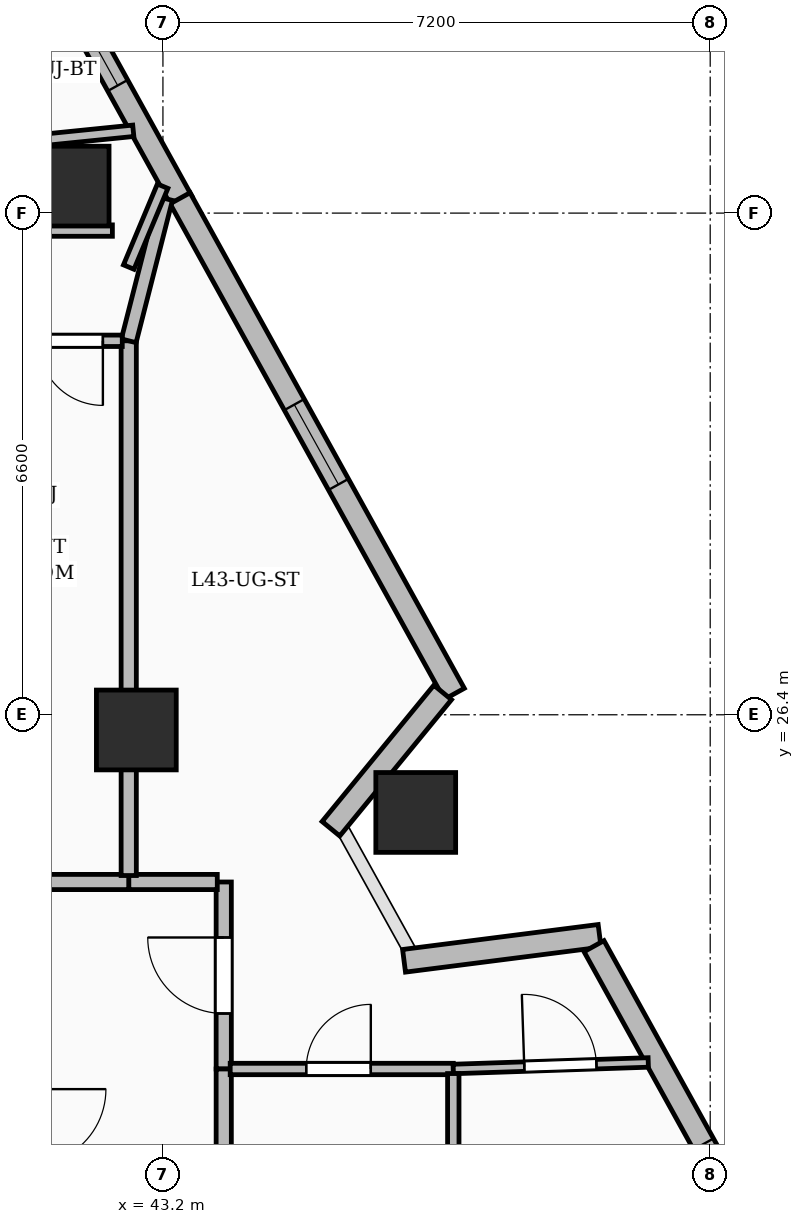
"""IFC4 building model, lengths in metres.
Left out: names, types, materials, properties, quantities, classifications, styles, units other than length and angle.
Written with IfcOpenShell. Run it as: python <this file> out.ifc"""

import sys

from ifc_helpers import new_model, si_unit, direction, frame, frame_2d, origin, origin_2d, place, context, subcontext, project, spatial, rectangle, extrude, element, fill, save


model = new_model("IFC4")
c1 = context("Model", 3, precision=1e-05, world=origin(), true_north=direction((0.0, 1.0)))
c2 = subcontext(c1, "Body", "Model", "MODEL_VIEW")
j1 = project(units=[si_unit("LENGTHUNIT", "METRE"), si_unit("PLANEANGLEUNIT", "RADIAN")], contexts=[c1])
p1 = place(None, origin())
s1 = spatial("IfcSite", under=j1, at=p1, CompositionType="ELEMENT")
p2 = place(p1, origin())
s2 = spatial("IfcBuilding", under=s1, at=p2, CompositionType="ELEMENT")
p3 = place(p2, frame((0.0, 0.0, 168.0)))
s3 = spatial("IfcBuildingStorey", under=s2, at=p3, CompositionType="ELEMENT", Elevation=168.0)
for number, where, z_axis, x_axis in (
    (1, (42.85, 26.2, 0.0), (0.0, 0.0, 1.0), (1.0, 0.0, 0.0)),
    (2, (46.526, 25.115, 0.0), (0.0, 0.0, 1.0), (1.0, 0.0, 0.0)),
    (3, (41.966, 33.355, 0.0), (0.0, 0.0, 1.0), (1.0, 0.0, 0.0)),
):
    element("IfcColumn", number, at=place(p3, frame(where, z_axis=z_axis, x_axis=x_axis)), inside=s3, PredefinedType="COLUMN", context=c2, shape_type="SweptSolid", body=[
        extrude(rectangle(XDim=1.05, YDim=1.05, at=origin_2d()), origin(), (0.0, 0.0, 1.0), 3.6),
    ])
p4 = place(p3, frame((40.148, 39.119, 0.0), z_axis=(0.0, 0.0, 1.0), x_axis=(0.484162803577, -0.87497793094, 0.0)))
e4 = element("IfcWall", 4, at=p4, inside=s3, PredefinedType="SOLIDWALL", context=c2, shape_type="SweptSolid", body=[
    extrude(rectangle(XDim=6.823, YDim=0.3, at=frame_2d((3.412, 0.0))), origin(), (0.0, 0.0, 1.0), 3.35),
])
p5 = place(p4, frame((3.575, 0.0, 0.6)))
e5 = element("IfcOpeningElement", 5, at=p5, cuts=e4, PredefinedType="OPENING", context=c2, shape_type="SweptSolid", body=[
    extrude(rectangle(XDim=1.5, YDim=2.1, at=frame_2d((0.75, 1.05))), frame((0.0, 0.16, 0.0), z_axis=(0.0, -1.0, 0.0), x_axis=(1.0, 0.0, 0.0)), (0.0, 0.0, 1.0), 0.32),
])
p6 = place(p3, frame((43.426, 33.195, 0.0), z_axis=(0.0, 0.0, 1.0), x_axis=(0.484187348611, -0.874964348671, 0.0)))
e6 = element("IfcWall", 6, at=p6, inside=s3, PredefinedType="SOLIDWALL", context=c2, shape_type="SweptSolid", body=[
    extrude(rectangle(XDim=7.451, YDim=0.3, at=frame_2d((3.726, 0.0))), origin(), (0.0, 0.0, 1.0), 3.35),
])
p7 = place(p6, frame((3.103, 0.0, 0.8)))
e7 = element("IfcOpeningElement", 7, at=p7, cuts=e6, PredefinedType="OPENING", context=c2, shape_type="SweptSolid", body=[
    extrude(rectangle(XDim=1.2, YDim=1.8, at=frame_2d((0.6, 0.9))), frame((0.0, 0.16, 0.0), z_axis=(0.0, -1.0, 0.0), x_axis=(1.0, 0.0, 0.0)), (0.0, 0.0, 1.0), 0.32),
])
p8 = place(p3, frame((46.88, 26.694, 0.0), z_axis=(0.0, 0.0, 1.0), x_axis=(-0.634074551455, -0.773271920606, 0.0)))
e8 = element("IfcWall", 8, at=p8, inside=s3, PredefinedType="SOLIDWALL", context=c2, shape_type="SweptSolid", body=[
    extrude(rectangle(XDim=2.319, YDim=0.3, at=frame_2d((1.159, 0.0))), origin(), (0.0, 0.0, 1.0), 2.575),
])
p9 = place(p3, frame((46.372, 23.163, 0.0), z_axis=(0.0, 0.0, 1.0), x_axis=(0.991953049751, 0.126606267974, 0.0)))
e9 = element("IfcWall", 9, at=p9, inside=s3, PredefinedType="SOLIDWALL", context=c2, shape_type="SweptSolid", body=[
    extrude(rectangle(XDim=2.594, YDim=0.3, at=frame_2d((1.297, 0.0))), origin(), (0.0, 0.0, 1.0), 2.575),
])
p10 = place(p3, frame((48.871, 23.356, 0.0), z_axis=(0.0, 0.0, 1.0), x_axis=(0.484178775102, -0.874969093021, 0.0)))
e10 = element("IfcWall", 10, at=p10, inside=s3, PredefinedType="SOLIDWALL", context=c2, shape_type="SweptSolid", body=[
    extrude(rectangle(XDim=6.742, YDim=0.3, at=frame_2d((3.371, 0.0))), origin(), (0.0, 0.0, 1.0), 3.35),
])
p11 = place(p10, frame((2.975, 0.0, 0.6)))
e11 = element("IfcOpeningElement", 11, at=p11, cuts=e10, PredefinedType="OPENING", context=c2, shape_type="SweptSolid", body=[
    extrude(rectangle(XDim=1.8, YDim=2.1, at=frame_2d((0.9, 1.05))), frame((0.0, 0.16, 0.0), z_axis=(0.0, -1.0, 0.0), x_axis=(1.0, 0.0, 0.0)), (0.0, 0.0, 1.0), 0.32),
])
p12 = place(p3, frame((44.0, 21.74, 0.0), z_axis=(0.0, 0.0, 1.0), x_axis=(0.0, 1.0, 0.0)))
e12 = element("IfcWall", 12, at=p12, inside=s3, PredefinedType="PARTITIONING", context=c2, shape_type="SweptSolid", body=[
    extrude(rectangle(XDim=2.46, YDim=0.2, at=frame_2d((1.23, 0.0))), origin(), (0.0, 0.0, 1.0), 2.436),
])
p13 = place(p12, frame((0.73, 0.0, 0.0)))
e13 = element("IfcOpeningElement", 13, at=p13, cuts=e12, PredefinedType="OPENING", context=c2, shape_type="SweptSolid", body=[
    extrude(rectangle(XDim=1.0, YDim=2.2, at=frame_2d((0.5, 1.1))), frame((0.0, 0.11, 0.0), z_axis=(0.0, -1.0, 0.0), x_axis=(1.0, 0.0, 0.0)), (0.0, 0.0, 1.0), 0.22),
])
p14 = place(p3, frame((43.915, 24.2, 0.0), z_axis=(0.0, 0.0, 1.0), x_axis=(-1.0, 0.0, 0.0)))
e14 = element("IfcWall", 14, at=p14, inside=s3, PredefinedType="PARTITIONING", context=c2, shape_type="SweptSolid", body=[
    extrude(rectangle(XDim=1.165, YDim=0.2, at=frame_2d((0.583, 0.0))), origin(), (0.0, 0.0, 1.0), 2.436),
])
p15 = place(p3, frame((44.0, 19.42, 0.0), z_axis=(0.0, 0.0, 1.0), x_axis=(0.0, 1.0, 0.0)))
e15 = element("IfcWall", 15, at=p15, inside=s3, PredefinedType="PARTITIONING", context=c2, shape_type="SweptSolid", body=[
    extrude(rectangle(XDim=2.32, YDim=0.2, at=frame_2d((1.16, 0.0))), origin(), (0.0, 0.0, 1.0), 3.35),
])
p16 = place(p3, frame((42.75, 24.2, 0.0), z_axis=(0.0, 0.0, 1.0), x_axis=(-1.0, 0.0, 0.0)))
e16 = element("IfcWall", 16, at=p16, inside=s3, PredefinedType="PARTITIONING", context=c2, shape_type="SweptSolid", body=[
    extrude(rectangle(XDim=1.3, YDim=0.2, at=frame_2d((0.65, 0.0))), origin(), (0.0, 0.0, 1.0), 3.35),
])
p17 = place(p3, frame((44.085, 21.74, 0.0), z_axis=(0.0, 0.0, 1.0), x_axis=(1.0, 0.0, 0.0)))
e17 = element("IfcWall", 17, at=p17, inside=s3, PredefinedType="PARTITIONING", context=c2, shape_type="SweptSolid", body=[
    extrude(rectangle(XDim=2.935, YDim=0.15, at=frame_2d((1.468, 0.0))), origin(), (0.0, 0.0, 1.0), 2.393),
])
p18 = place(p17, frame((1.0, 0.0, 0.0)))
e18 = element("IfcOpeningElement", 18, at=p18, cuts=e17, PredefinedType="OPENING", context=c2, shape_type="SweptSolid", body=[
    extrude(rectangle(XDim=0.85, YDim=2.1, at=frame_2d((0.425, 1.05))), frame((0.0, 0.085, 0.0), z_axis=(0.0, -1.0, 0.0), x_axis=(1.0, 0.0, 0.0)), (0.0, 0.0, 1.0), 0.17),
])
p19 = place(p3, frame((47.02, 21.74, 0.0), z_axis=(0.0, 0.0, 1.0), x_axis=(0.999439190858, 0.03348587428, 0.0)))
e19 = element("IfcWall", 19, at=p19, inside=s3, PredefinedType="PARTITIONING", context=c2, shape_type="SweptSolid", body=[
    extrude(rectangle(XDim=2.566, YDim=0.125, at=frame_2d((1.283, 0.0))), origin(), (0.0, 0.0, 1.0), 2.57),
])
p20 = place(p19, frame((0.934, 0.0, 0.0)))
e20 = element("IfcOpeningElement", 20, at=p20, cuts=e19, PredefinedType="OPENING", context=c2, shape_type="SweptSolid", body=[
    extrude(rectangle(XDim=0.95, YDim=2.2, at=frame_2d((0.475, 1.1))), frame((0.0, 0.072, 0.0), z_axis=(0.0, -1.0, 0.0), x_axis=(1.0, 0.0, 0.0)), (0.0, 0.0, 1.0), 0.145),
])
p21 = place(p3, frame((42.75, 31.32, 0.0), z_axis=(0.0, 0.0, 1.0), x_axis=(0.0, -1.0, 0.0)))
e21 = element("IfcWall", 21, at=p21, inside=s3, PredefinedType="PARTITIONING", context=c2, shape_type="SweptSolid", body=[
    extrude(rectangle(XDim=7.035, YDim=0.2, at=frame_2d((3.518, 0.0))), origin(), (0.0, 0.0, 1.0), 2.393),
])
p22 = place(p3, frame((43.228, 33.192, 0.0), z_axis=(0.0, 0.0, 1.0), x_axis=(-0.247320136716, -0.968933821257, 0.0)))
e22 = element("IfcWall", 22, at=p22, inside=s3, PredefinedType="PARTITIONING", context=c2, shape_type="SweptSolid", body=[
    extrude(rectangle(XDim=1.932, YDim=0.2, at=frame_2d((0.966, 0.0))), origin(), (0.0, 0.0, 1.0), 2.57),
])
p23 = place(p3, frame((47.02, 17.835, 0.0), z_axis=(0.0, 0.0, 1.0), x_axis=(0.0, 1.0, 0.0)))
e23 = element("IfcWall", 23, at=p23, inside=s3, PredefinedType="PARTITIONING", context=c2, shape_type="SweptSolid", body=[
    extrude(rectangle(XDim=3.845, YDim=0.15, at=frame_2d((1.922, 0.0))), origin(), (0.0, 0.0, 1.0), 2.771),
])
p24 = place(p3, frame((42.665, 31.32, 0.0), z_axis=(0.0, 0.0, 1.0), x_axis=(-1.0, 0.0, 0.0)))
e24 = element("IfcWall", 24, at=p24, inside=s3, PredefinedType="PARTITIONING", context=c2, shape_type="SweptSolid", body=[
    extrude(rectangle(XDim=1.545, YDim=0.15, at=frame_2d((0.772, 0.0))), origin(), (0.0, 0.0, 1.0), 2.393),
])
p25 = place(p24, frame((0.255, 0.0, 0.0)))
e25 = element("IfcOpeningElement", 25, at=p25, cuts=e24, PredefinedType="OPENING", context=c2, shape_type="SweptSolid", body=[
    extrude(rectangle(XDim=0.85, YDim=2.1, at=frame_2d((0.425, 1.05))), frame((0.0, 0.085, 0.0), z_axis=(0.0, -1.0, 0.0), x_axis=(1.0, 0.0, 0.0)), (0.0, 0.0, 1.0), 0.17),
])
p26 = place(p3, frame((42.75, 32.29, 0.0), z_axis=(0.0, 0.0, 1.0), x_axis=(0.38662798091, 0.922235763987, 0.0)))
e26 = element("IfcWall", 26, at=p26, inside=s3, PredefinedType="PARTITIONING", context=c2, shape_type="SweptSolid", body=[
    extrude(rectangle(XDim=1.154, YDim=0.15, at=frame_2d((0.577, 0.0))), origin(), (0.0, 0.0, 1.0), 2.57),
])
p27 = place(p3, frame((42.535, 32.77, 0.0), z_axis=(0.0, 0.0, 1.0), x_axis=(-1.0, 0.0, 0.0)))
e27 = element("IfcWall", 27, at=p27, inside=s3, PredefinedType="PARTITIONING", context=c2, shape_type="SweptSolid", body=[
    extrude(rectangle(XDim=1.155, YDim=0.15, at=frame_2d((0.578, 0.0))), origin(), (0.0, 0.0, 1.0), 2.393),
])
p28 = place(p3, frame((41.398, 33.94, 0.0), z_axis=(0.0, 0.0, 1.0), x_axis=(0.994906914974, 0.10079796891, 0.0)))
e28 = element("IfcWall", 28, at=p28, inside=s3, PredefinedType="PARTITIONING", context=c2, shape_type="SweptSolid", body=[
    extrude(rectangle(XDim=1.419, YDim=0.15, at=frame_2d((0.71, 0.0))), origin(), (0.0, 0.0, 1.0), 3.35),
])
p29 = place(p5, origin())
e29 = element("IfcWindow", 29, at=p29, inside=s3, PartitioningType="SINGLE_PANEL", PredefinedType="WINDOW", context=c2, shape_type="SweptSolid", body=[
    extrude(rectangle(XDim=1.5, YDim=2.1, at=frame_2d((0.75, 1.05))), frame((0.0, 0.03, 0.0), z_axis=(0.0, -1.0, 0.0), x_axis=(1.0, 0.0, 0.0)), (0.0, 0.0, 1.0), 0.06),
])
fill(e5, e29)
p30 = place(p7, origin())
e30 = element("IfcWindow", 30, at=p30, inside=s3, PartitioningType="SINGLE_PANEL", PredefinedType="WINDOW", context=c2, shape_type="SweptSolid", body=[
    extrude(rectangle(XDim=1.2, YDim=1.8, at=frame_2d((0.6, 0.9))), frame((0.0, 0.03, 0.0), z_axis=(0.0, -1.0, 0.0), x_axis=(1.0, 0.0, 0.0)), (0.0, 0.0, 1.0), 0.06),
])
fill(e7, e30)
p31 = place(p11, origin())
e31 = element("IfcWindow", 31, at=p31, inside=s3, PartitioningType="SINGLE_PANEL", PredefinedType="WINDOW", context=c2, shape_type="SweptSolid", body=[
    extrude(rectangle(XDim=1.8, YDim=2.1, at=frame_2d((0.9, 1.05))), frame((0.0, 0.03, 0.0), z_axis=(0.0, -1.0, 0.0), x_axis=(1.0, 0.0, 0.0)), (0.0, 0.0, 1.0), 0.06),
])
fill(e11, e31)
p32 = place(p13, origin())
e32 = element("IfcDoor", 32, at=p32, inside=s3, OperationType="SINGLE_SWING_RIGHT", PredefinedType="DOOR", context=c2, shape_type="SweptSolid", body=[
    extrude(rectangle(XDim=1.0, YDim=2.2, at=frame_2d((0.5, 1.1))), frame((0.0, 0.025, 0.0), z_axis=(0.0, -1.0, 0.0), x_axis=(1.0, 0.0, 0.0)), (0.0, 0.0, 1.0), 0.05),
])
fill(e13, e32)
p33 = place(p20, origin())
e33 = element("IfcDoor", 33, at=p33, inside=s3, OperationType="SINGLE_SWING_LEFT", PredefinedType="DOOR", context=c2, shape_type="SweptSolid", body=[
    extrude(rectangle(XDim=0.95, YDim=2.2, at=frame_2d((0.475, 1.1))), frame((0.0, 0.025, 0.0), z_axis=(0.0, -1.0, 0.0), x_axis=(1.0, 0.0, 0.0)), (0.0, 0.0, 1.0), 0.05),
])
fill(e20, e33)
p34 = place(p18, origin())
e34 = element("IfcDoor", 34, at=p34, inside=s3, OperationType="SINGLE_SWING_RIGHT", PredefinedType="DOOR", context=c2, shape_type="SweptSolid", body=[
    extrude(rectangle(XDim=0.85, YDim=2.1, at=frame_2d((0.425, 1.05))), frame((0.0, 0.025, 0.0), z_axis=(0.0, -1.0, 0.0), x_axis=(1.0, 0.0, 0.0)), (0.0, 0.0, 1.0), 0.05),
])
fill(e18, e34)
p35 = place(p25, origin())
e35 = element("IfcDoor", 35, at=p35, inside=s3, OperationType="SINGLE_SWING_LEFT", PredefinedType="DOOR", context=c2, shape_type="SweptSolid", body=[
    extrude(rectangle(XDim=0.85, YDim=2.1, at=frame_2d((0.425, 1.05))), frame((0.0, 0.025, 0.0), z_axis=(0.0, -1.0, 0.0), x_axis=(1.0, 0.0, 0.0)), (0.0, 0.0, 1.0), 0.05),
])
fill(e25, e35)
save(model, sys.argv[1])
